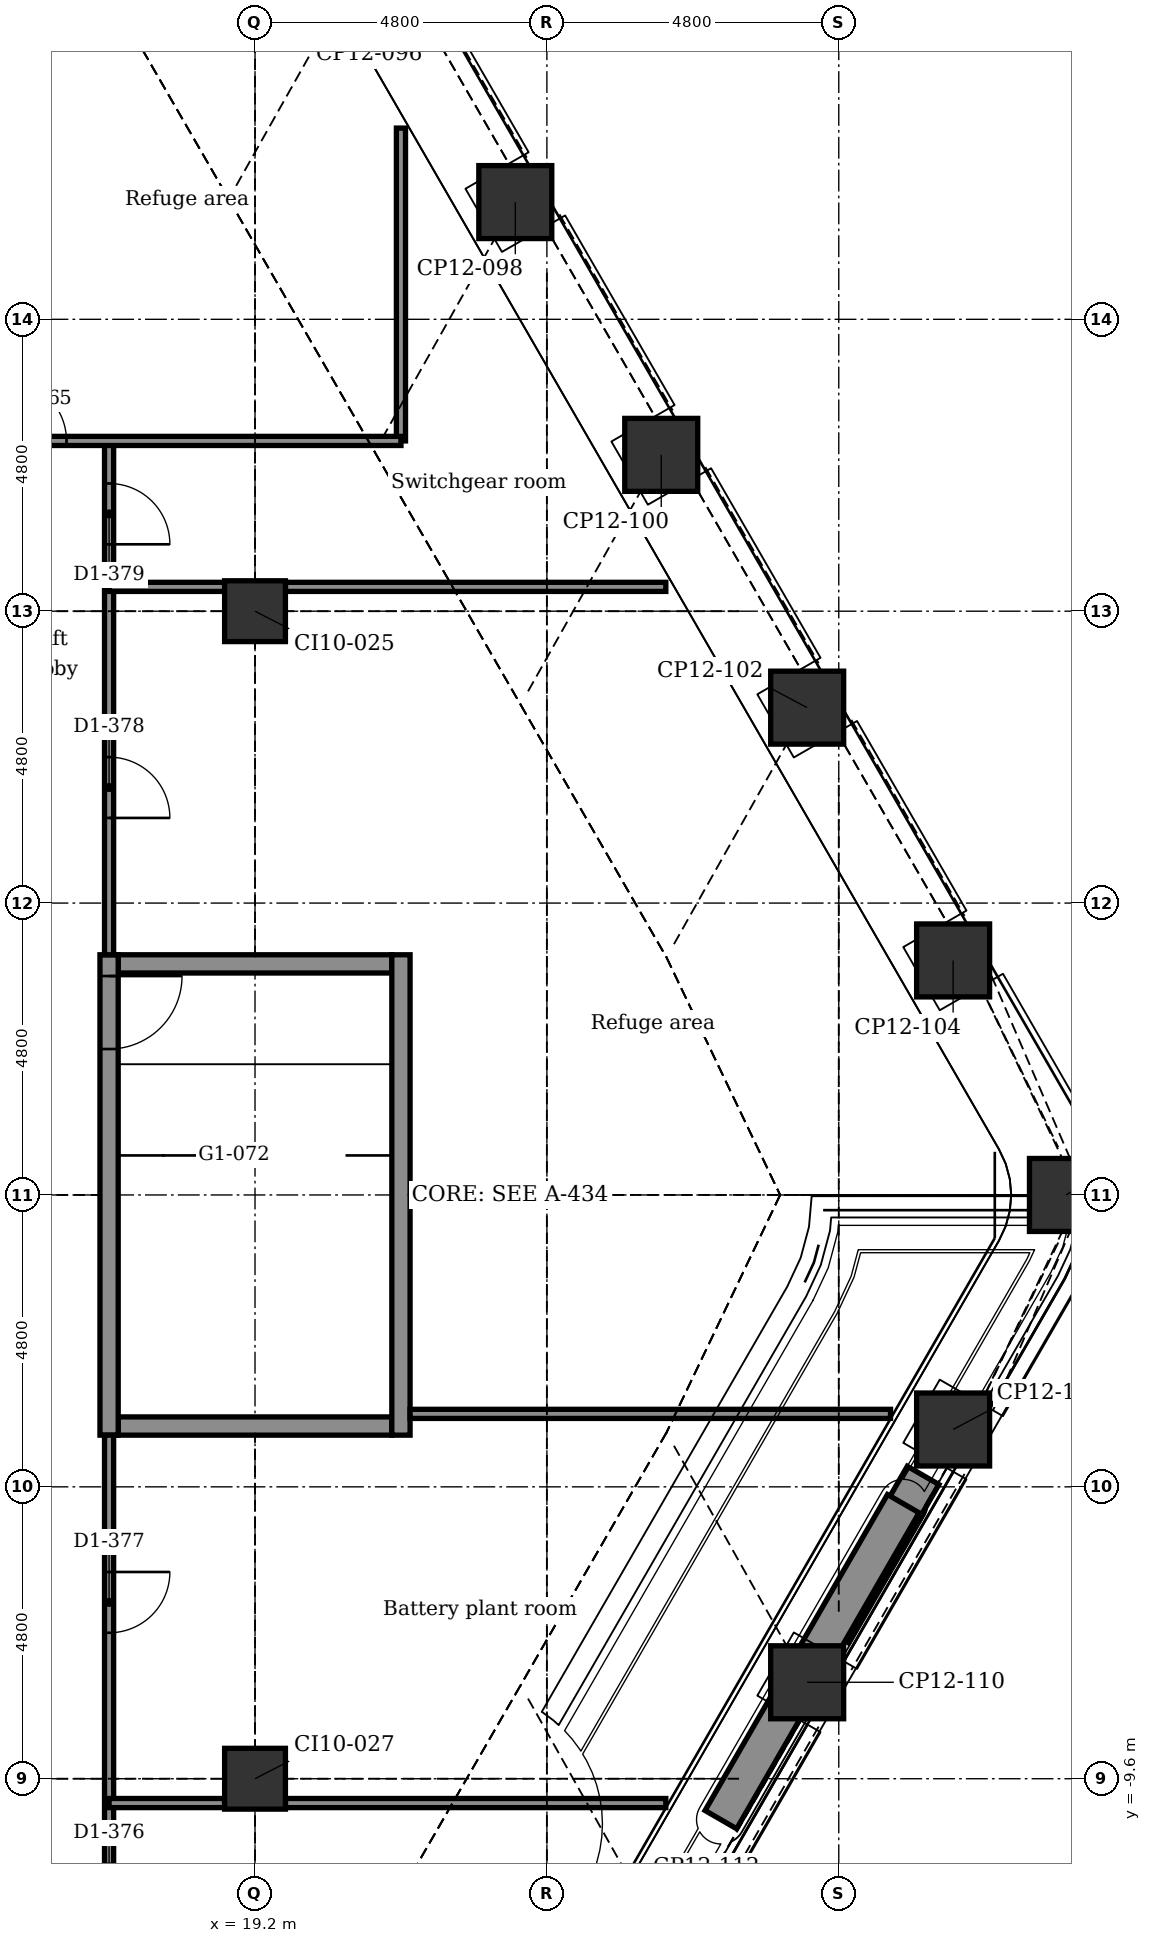
"""IFC4 building model, lengths in metres.
Left out: names, types, materials, properties, quantities, classifications, styles, units other than length and angle.
Written with IfcOpenShell. Run it as: python <this file> out.ifc"""

import sys

from ifc_helpers import new_model, si_unit, direction, frame, frame_2d, origin, origin_2d, place, context, subcontext, project, spatial, rectangle, extrude, element, fill, save


model = new_model("IFC4")
c1 = context("Model", 3, precision=1e-05, world=origin(), true_north=direction((0.0, 1.0)))
c2 = subcontext(c1, "Body", "Model", "MODEL_VIEW")
j1 = project(units=[si_unit("LENGTHUNIT", "METRE"), si_unit("PLANEANGLEUNIT", "RADIAN")], contexts=[c1])
p1 = place(None, origin())
s1 = spatial("IfcSite", under=j1, at=p1, CompositionType="ELEMENT")
p2 = place(p1, origin())
s2 = spatial("IfcBuilding", under=s1, at=p2, CompositionType="ELEMENT")
p3 = place(p2, frame((0.0, 0.0, 127.4)))
s3 = spatial("IfcBuildingStorey", under=s2, at=p3, CompositionType="ELEMENT", Elevation=127.4)
for number, where, z_axis, x_axis in (
    (1, (23.48, 16.328, -0.3), (0.0, 0.0, 1.0), (0.866, 0.5, 0.0)),
    (2, (25.88, 12.171, -0.3), (0.0, 0.0, 1.0), (0.866, 0.5, 0.0)),
    (3, (28.28, 8.014, -0.3), (0.0, 0.0, 1.0), (0.866, 0.5, 0.0)),
    (4, (30.68, 3.857, -0.3), (0.0, 0.0, 1.0), (0.866, 0.5, 0.0)),
    (5, (32.536, 0.0, -0.3), (0.0, 0.0, 1.0), (1.0, 0.0, 0.0)),
    (6, (30.68, -3.857, -0.3), (0.0, 0.0, 1.0), (0.5, 0.866, 0.0)),
    (7, (28.28, -8.014, -0.3), (0.0, 0.0, 1.0), (0.5, 0.866, 0.0)),
):
    element("IfcColumn", number, at=place(p3, frame(where, z_axis=z_axis, x_axis=x_axis)), inside=s3, PredefinedType="COLUMN", context=c2, shape_type="SweptSolid", body=[
        extrude(rectangle(XDim=1.2, YDim=1.2, at=origin_2d()), origin(), (0.0, 0.0, 1.0), 6.15),
    ])
for number, where, z_axis, x_axis in (
    (8, (19.2, -9.6, -0.3), (0.0, 0.0, 1.0), (1.0, 0.0, 0.0)),
    (9, (19.2, 9.6, -0.3), (0.0, 0.0, 1.0), (1.0, 0.0, 0.0)),
):
    element("IfcColumn", number, at=place(p3, frame(where, z_axis=z_axis, x_axis=x_axis)), inside=s3, PredefinedType="COLUMN", context=c2, shape_type="SweptSolid", body=[
        extrude(rectangle(XDim=1.0, YDim=1.0, at=origin_2d()), origin(), (0.0, 0.0, 1.0), 6.15),
    ])
for number, where, z_axis, x_axis in (
    (10, (16.95, -3.8, -0.3), (0.0, 0.0, 1.0), (1.0, 0.0, 0.0)),
    (11, (16.95, 3.8, -0.3), (0.0, 0.0, 1.0), (1.0, 0.0, 0.0)),
):
    element("IfcWall", number, at=place(p3, frame(where, z_axis=z_axis, x_axis=x_axis)), inside=s3, PredefinedType="STANDARD", context=c2, shape_type="SweptSolid", body=[
        extrude(rectangle(XDim=4.5, YDim=0.3, at=frame_2d((2.25, 0.0))), origin(), (0.0, 0.0, 1.0), 6.15),
    ])
p4 = place(p3, frame((16.8, -3.95, -0.3), z_axis=(0.0, 0.0, 1.0), x_axis=(0.0, 1.0, 0.0)))
e12 = element("IfcWall", 12, at=p4, inside=s3, PredefinedType="STANDARD", context=c2, shape_type="SweptSolid", body=[
    extrude(rectangle(XDim=7.9, YDim=0.3, at=frame_2d((3.95, 0.0))), origin(), (0.0, 0.0, 1.0), 6.15),
])
p5 = place(p4, frame((6.35, 0.0, 0.3)))
e13 = element("IfcOpeningElement", 13, at=p5, cuts=e12, PredefinedType="OPENING", context=c2, shape_type="SweptSolid", body=[
    extrude(rectangle(XDim=1.2, YDim=2.1, at=frame_2d((0.6, 1.05))), frame((0.0, 0.16, 0.0), z_axis=(0.0, -1.0, 0.0), x_axis=(1.0, 0.0, 0.0)), (0.0, 0.0, 1.0), 0.32),
])
p6 = place(p3, frame((21.6, -3.95, -0.3), z_axis=(0.0, 0.0, 1.0), x_axis=(0.0, 1.0, 0.0)))
e14 = element("IfcWall", 14, at=p6, inside=s3, PredefinedType="STANDARD", context=c2, shape_type="SweptSolid", body=[
    extrude(rectangle(XDim=7.9, YDim=0.3, at=frame_2d((3.95, 0.0))), origin(), (0.0, 0.0, 1.0), 6.15),
])
p7 = place(p3, frame((30.187, -4.611, 0.0), z_axis=(0.0, 0.0, 1.0), x_axis=(-0.499990139034, -0.866031096941, 0.0)))
e15 = element("IfcWall", 15, at=p7, inside=s3, PredefinedType="USERDEFINED", context=c2, shape_type="SweptSolid", body=[
    extrude(rectangle(XDim=3.0, YDim=0.6, at=frame_2d((1.5, 0.0))), origin(), (0.0, 0.0, 1.0), 0.7),
])
p8 = place(p3, frame((29.861, -5.076, 6.0), z_axis=(0.0, 0.0, 1.0), x_axis=(-0.499990139034, -0.866031096941, 0.0)))
e16 = element("IfcWall", 16, at=p8, inside=s3, PredefinedType="USERDEFINED", context=c2, shape_type="SweptSolid", body=[
    extrude(rectangle(XDim=6.0, YDim=0.6, at=frame_2d((3.0, 0.0))), origin(), (0.0, 0.0, 1.0), 0.7),
])
p9 = place(p3, frame((21.6, 12.4, 0.0), z_axis=(0.0, 0.0, 1.0), x_axis=(0.0, 1.0, 0.0)))
e17 = element("IfcWall", 17, at=p9, inside=s3, PredefinedType="PARTITIONING", context=c2, shape_type="SweptSolid", body=[
    extrude(rectangle(XDim=5.145, YDim=0.15, at=frame_2d((2.572, 0.0))), origin(), (0.0, 0.0, 1.0), 5.85),
])
p10 = place(p3, frame((16.8, -13.0, 0.0), z_axis=(0.0, 0.0, 1.0), x_axis=(0.0, 1.0, 0.0)))
e18 = element("IfcWall", 18, at=p10, inside=s3, PredefinedType="PARTITIONING", context=c2, shape_type="SweptSolid", body=[
    extrude(rectangle(XDim=9.05, YDim=0.15, at=frame_2d((4.525, 0.0))), origin(), (0.0, 0.0, 1.0), 5.85),
])
p11 = place(p10, frame((1.0, 0.0, 0.0)))
e19 = element("IfcOpeningElement", 19, at=p11, cuts=e18, PredefinedType="OPENING", context=c2, shape_type="SweptSolid", body=[
    extrude(rectangle(XDim=1.0, YDim=2.1, at=frame_2d((0.5, 1.05))), frame((0.0, 0.085, 0.0), z_axis=(0.0, -1.0, 0.0), x_axis=(1.0, 0.0, 0.0)), (0.0, 0.0, 1.0), 0.17),
])
p12 = place(p10, frame((5.8, 0.0, 0.0)))
e20 = element("IfcOpeningElement", 20, at=p12, cuts=e18, PredefinedType="OPENING", context=c2, shape_type="SweptSolid", body=[
    extrude(rectangle(XDim=1.0, YDim=2.1, at=frame_2d((0.5, 1.05))), frame((0.0, 0.085, 0.0), z_axis=(0.0, -1.0, 0.0), x_axis=(1.0, 0.0, 0.0)), (0.0, 0.0, 1.0), 0.17),
])
p13 = place(p3, frame((16.8, 3.95, 0.0), z_axis=(0.0, 0.0, 1.0), x_axis=(0.0, 1.0, 0.0)))
e21 = element("IfcWall", 21, at=p13, inside=s3, PredefinedType="PARTITIONING", context=c2, shape_type="SweptSolid", body=[
    extrude(rectangle(XDim=8.45, YDim=0.15, at=frame_2d((4.225, 0.0))), origin(), (0.0, 0.0, 1.0), 5.85),
])
p14 = place(p13, frame((2.25, 0.0, 0.0)))
e22 = element("IfcOpeningElement", 22, at=p14, cuts=e21, PredefinedType="OPENING", context=c2, shape_type="SweptSolid", body=[
    extrude(rectangle(XDim=1.0, YDim=2.1, at=frame_2d((0.5, 1.05))), frame((0.0, 0.085, 0.0), z_axis=(0.0, -1.0, 0.0), x_axis=(1.0, 0.0, 0.0)), (0.0, 0.0, 1.0), 0.17),
])
p15 = place(p13, frame((6.75, 0.0, 0.0)))
e23 = element("IfcOpeningElement", 23, at=p15, cuts=e21, PredefinedType="OPENING", context=c2, shape_type="SweptSolid", body=[
    extrude(rectangle(XDim=1.0, YDim=2.1, at=frame_2d((0.5, 1.05))), frame((0.0, 0.085, 0.0), z_axis=(0.0, -1.0, 0.0), x_axis=(1.0, 0.0, 0.0)), (0.0, 0.0, 1.0), 0.17),
])
p16 = place(p3, frame((16.8, -10.0, 0.0), z_axis=(0.0, 0.0, 1.0), x_axis=(1.0, 0.0, 0.0)))
e24 = element("IfcWall", 24, at=p16, inside=s3, PredefinedType="PARTITIONING", context=c2, shape_type="SweptSolid", body=[
    extrude(rectangle(XDim=1.9, YDim=0.15, at=frame_2d((0.95, 0.0))), origin(), (0.0, 0.0, 1.0), 5.85),
])
p17 = place(p3, frame((19.7, -10.0, 0.0), z_axis=(0.0, 0.0, 1.0), x_axis=(1.0, 0.0, 0.0)))
e25 = element("IfcWall", 25, at=p17, inside=s3, PredefinedType="PARTITIONING", context=c2, shape_type="SweptSolid", body=[
    extrude(rectangle(XDim=6.256, YDim=0.15, at=frame_2d((3.128, 0.0))), origin(), (0.0, 0.0, 1.0), 5.7),
])
p18 = place(p3, frame((21.75, -3.6, 0.0), z_axis=(0.0, 0.0, 1.0), x_axis=(1.0, 0.0, 0.0)))
e26 = element("IfcWall", 26, at=p18, inside=s3, PredefinedType="PARTITIONING", context=c2, shape_type="SweptSolid", body=[
    extrude(rectangle(XDim=7.901, YDim=0.15, at=frame_2d((3.95, 0.0))), origin(), (0.0, 0.0, 1.0), 5.7),
])
p19 = place(p3, frame((16.8, 10.0, 0.0), z_axis=(0.0, 0.0, 1.0), x_axis=(1.0, 0.0, 0.0)))
e27 = element("IfcWall", 27, at=p19, inside=s3, PredefinedType="PARTITIONING", context=c2, shape_type="SweptSolid", body=[
    extrude(rectangle(XDim=1.9, YDim=0.15, at=frame_2d((0.95, 0.0))), origin(), (0.0, 0.0, 1.0), 5.85),
])
p20 = place(p3, frame((19.7, 10.0, 0.0), z_axis=(0.0, 0.0, 1.0), x_axis=(1.0, 0.0, 0.0)))
e28 = element("IfcWall", 28, at=p20, inside=s3, PredefinedType="PARTITIONING", context=c2, shape_type="SweptSolid", body=[
    extrude(rectangle(XDim=6.256, YDim=0.15, at=frame_2d((3.128, 0.0))), origin(), (0.0, 0.0, 1.0), 5.85),
])
p21 = place(p3, frame((-21.6, 12.4, 0.0), z_axis=(0.0, 0.0, 1.0), x_axis=(1.0, 0.0, 0.0)))
e29 = element("IfcWall", 29, at=p21, inside=s3, PredefinedType="PARTITIONING", context=c2, shape_type="SweptSolid", body=[
    extrude(rectangle(XDim=43.2, YDim=0.15, at=frame_2d((21.6, 0.0))), origin(), (0.0, 0.0, 1.0), 5.85),
])
p22 = place(p21, frame((6.7, 0.0, 0.0)))
e30 = element("IfcOpeningElement", 30, at=p22, cuts=e29, PredefinedType="OPENING", context=c2, shape_type="SweptSolid", body=[
    extrude(rectangle(XDim=1.0, YDim=2.1, at=frame_2d((0.5, 1.05))), frame((0.0, 0.085, 0.0), z_axis=(0.0, -1.0, 0.0), x_axis=(1.0, 0.0, 0.0)), (0.0, 0.0, 1.0), 0.17),
])
p23 = place(p21, frame((15.1, 0.0, 0.0)))
e31 = element("IfcOpeningElement", 31, at=p23, cuts=e29, PredefinedType="OPENING", context=c2, shape_type="SweptSolid", body=[
    extrude(rectangle(XDim=1.0, YDim=2.1, at=frame_2d((0.5, 1.05))), frame((0.0, 0.085, 0.0), z_axis=(0.0, -1.0, 0.0), x_axis=(1.0, 0.0, 0.0)), (0.0, 0.0, 1.0), 0.17),
])
p24 = place(p21, frame((19.9, 0.0, 0.0)))
e32 = element("IfcOpeningElement", 32, at=p24, cuts=e29, PredefinedType="OPENING", context=c2, shape_type="SweptSolid", body=[
    extrude(rectangle(XDim=1.0, YDim=2.1, at=frame_2d((0.5, 1.05))), frame((0.0, 0.085, 0.0), z_axis=(0.0, -1.0, 0.0), x_axis=(1.0, 0.0, 0.0)), (0.0, 0.0, 1.0), 0.17),
])
p25 = place(p21, frame((22.3, 0.0, 0.0)))
e33 = element("IfcOpeningElement", 33, at=p25, cuts=e29, PredefinedType="OPENING", context=c2, shape_type="SweptSolid", body=[
    extrude(rectangle(XDim=1.0, YDim=2.1, at=frame_2d((0.5, 1.05))), frame((0.0, 0.085, 0.0), z_axis=(0.0, -1.0, 0.0), x_axis=(1.0, 0.0, 0.0)), (0.0, 0.0, 1.0), 0.17),
])
p26 = place(p21, frame((25.245, 0.0, 0.0)))
e34 = element("IfcOpeningElement", 34, at=p26, cuts=e29, PredefinedType="OPENING", context=c2, shape_type="SweptSolid", body=[
    extrude(rectangle(XDim=1.0, YDim=2.1, at=frame_2d((0.5, 1.05))), frame((0.0, 0.085, 0.0), z_axis=(0.0, -1.0, 0.0), x_axis=(1.0, 0.0, 0.0)), (0.0, 0.0, 1.0), 0.17),
])
p27 = place(p21, frame((36.7, 0.0, 0.0)))
e35 = element("IfcOpeningElement", 35, at=p27, cuts=e29, PredefinedType="OPENING", context=c2, shape_type="SweptSolid", body=[
    extrude(rectangle(XDim=1.0, YDim=2.1, at=frame_2d((0.5, 1.05))), frame((0.0, 0.085, 0.0), z_axis=(0.0, -1.0, 0.0), x_axis=(1.0, 0.0, 0.0)), (0.0, 0.0, 1.0), 0.17),
])
p28 = place(p27, origin())
e36 = element("IfcDoor", 36, at=p28, inside=s3, OperationType="SINGLE_SWING_LEFT", PredefinedType="DOOR", context=c2, shape_type="SweptSolid", body=[
    extrude(rectangle(XDim=1.0, YDim=2.1, at=frame_2d((0.5, 1.05))), frame((0.0, 0.025, 0.0), z_axis=(0.0, -1.0, 0.0), x_axis=(1.0, 0.0, 0.0)), (0.0, 0.0, 1.0), 0.05),
])
fill(e35, e36)
p29 = place(p12, frame((1.0, 0.0, 0.0), z_axis=(0.0, 0.0, 1.0), x_axis=(-1.0, 0.0, 0.0)))
e37 = element("IfcDoor", 37, at=p29, inside=s3, OperationType="SINGLE_SWING_RIGHT", PredefinedType="DOOR", context=c2, shape_type="SweptSolid", body=[
    extrude(rectangle(XDim=1.0, YDim=2.1, at=frame_2d((0.5, 1.05))), frame((0.0, 0.025, 0.0), z_axis=(0.0, -1.0, 0.0), x_axis=(1.0, 0.0, 0.0)), (0.0, 0.0, 1.0), 0.05),
])
fill(e20, e37)
p30 = place(p14, frame((1.0, 0.0, 0.0), z_axis=(0.0, 0.0, 1.0), x_axis=(-1.0, 0.0, 0.0)))
e38 = element("IfcDoor", 38, at=p30, inside=s3, OperationType="SINGLE_SWING_LEFT", PredefinedType="DOOR", context=c2, shape_type="SweptSolid", body=[
    extrude(rectangle(XDim=1.0, YDim=2.1, at=frame_2d((0.5, 1.05))), frame((0.0, 0.025, 0.0), z_axis=(0.0, -1.0, 0.0), x_axis=(1.0, 0.0, 0.0)), (0.0, 0.0, 1.0), 0.05),
])
fill(e22, e38)
p31 = place(p15, frame((1.0, 0.0, 0.0), z_axis=(0.0, 0.0, 1.0), x_axis=(-1.0, 0.0, 0.0)))
e39 = element("IfcDoor", 39, at=p31, inside=s3, OperationType="SINGLE_SWING_LEFT", PredefinedType="DOOR", context=c2, shape_type="SweptSolid", body=[
    extrude(rectangle(XDim=1.0, YDim=2.1, at=frame_2d((0.5, 1.05))), frame((0.0, 0.025, 0.0), z_axis=(0.0, -1.0, 0.0), x_axis=(1.0, 0.0, 0.0)), (0.0, 0.0, 1.0), 0.05),
])
fill(e23, e39)
p32 = place(p5, frame((1.2, 0.0, 0.0), z_axis=(0.0, 0.0, 1.0), x_axis=(-1.0, 0.0, 0.0)))
e40 = element("IfcDoor", 40, at=p32, inside=s3, OperationType="SINGLE_SWING_RIGHT", PredefinedType="DOOR", context=c2, shape_type="SweptSolid", body=[
    extrude(rectangle(XDim=1.2, YDim=2.1, at=frame_2d((0.6, 1.05))), frame((0.0, 0.025, 0.0), z_axis=(0.0, -1.0, 0.0), x_axis=(1.0, 0.0, 0.0)), (0.0, 0.0, 1.0), 0.05),
])
fill(e13, e40)
save(model, sys.argv[1])
